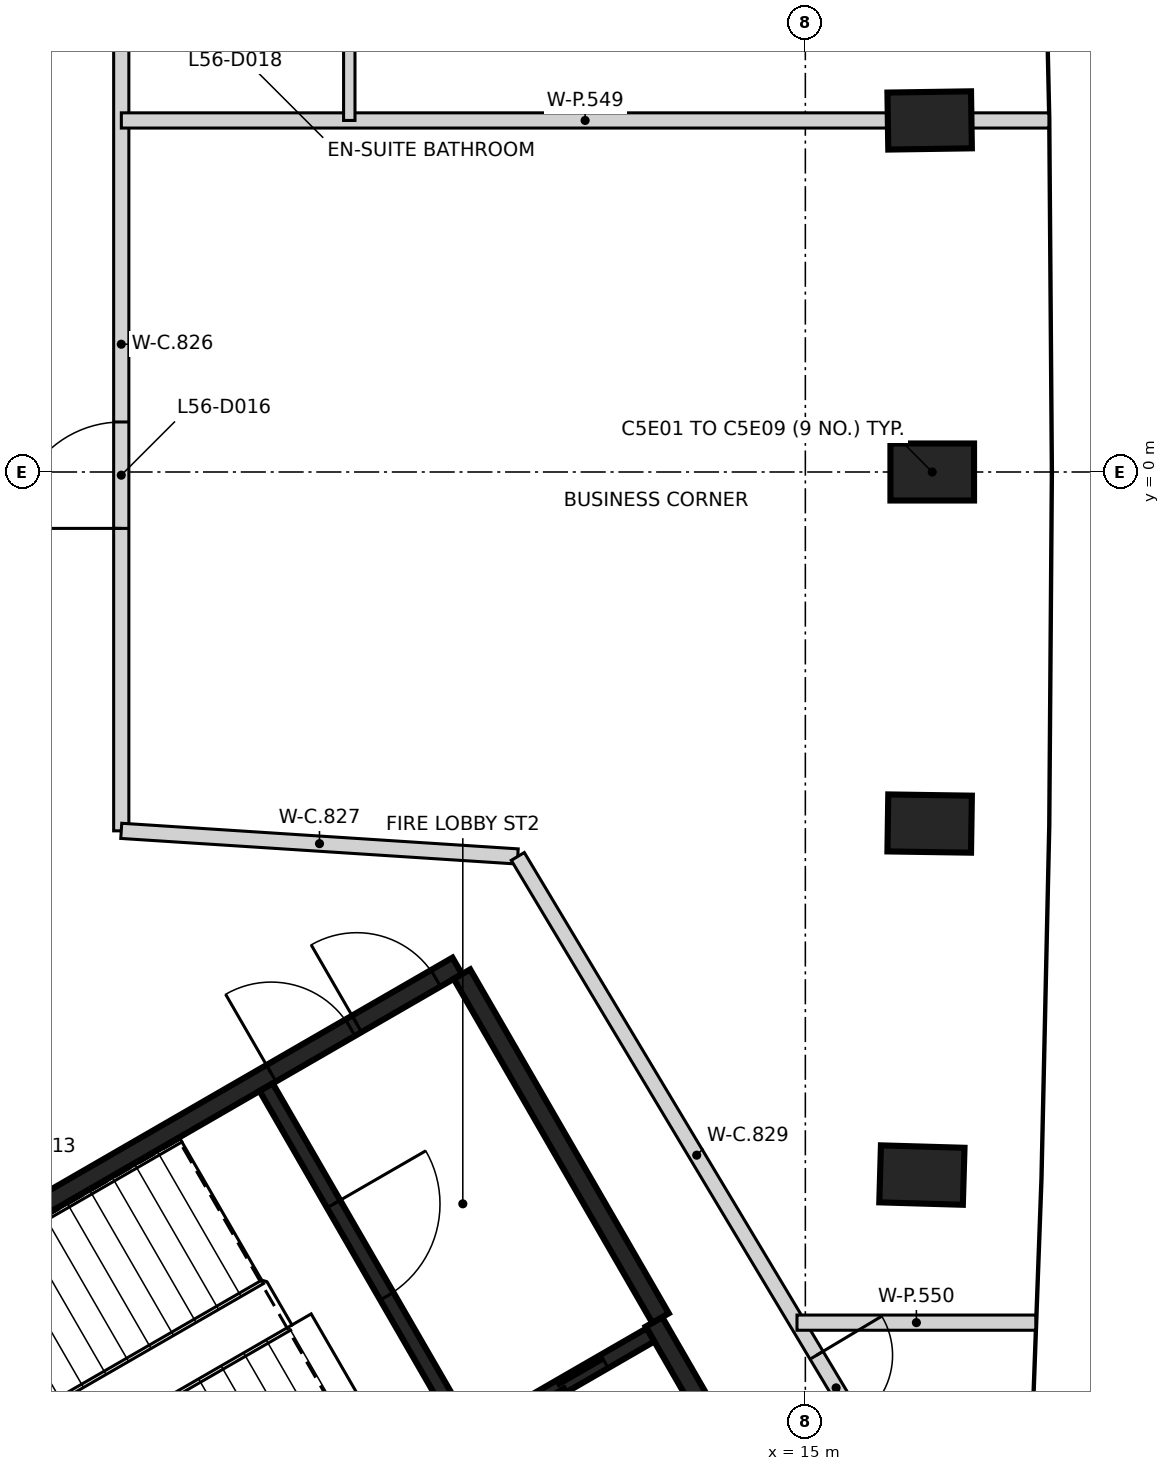
"""IFC4 building model, lengths in metres.
Left out: names, types, materials, properties, quantities, classifications, styles, units other than length and angle.
Written with IfcOpenShell. Run it as: python <this file> out.ifc"""

import sys

from ifc_helpers import new_model, si_unit, direction, frame, frame_2d, origin, origin_2d, place, context, subcontext, project, spatial, rectangle, extrude, element, fill, save


model = new_model("IFC4")
c1 = context("Model", 3, precision=1e-05, world=origin(), true_north=direction((0.0, 1.0)))
c2 = subcontext(c1, "Body", "Model", "MODEL_VIEW")
j1 = project(units=[si_unit("LENGTHUNIT", "METRE"), si_unit("PLANEANGLEUNIT", "RADIAN")], contexts=[c1])
p1 = place(None, origin())
s1 = spatial("IfcSite", under=j1, at=p1, CompositionType="ELEMENT")
p2 = place(p1, origin())
s2 = spatial("IfcBuilding", under=s1, at=p2, CompositionType="ELEMENT")
p3 = place(p2, frame((0.0, 0.0, 225.0)))
s3 = spatial("IfcBuildingStorey", under=s2, at=p3, CompositionType="ELEMENT", Elevation=225.0)
for number, where, z_axis, x_axis in (
    (1, (16.533, -9.25, -0.35), (0.0, 0.0, 1.0), (-1.0, 0.029, 0.0)),
    (2, (16.635, -4.625, -0.35), (0.0, 0.0, 1.0), (-1.0, 0.015, 0.0)),
    (3, (16.669, 0.0, -0.35), (0.0, 0.0, 1.0), (1.0, 0.0, 0.0)),
    (4, (16.635, 4.625, -0.35), (0.0, 0.0, 1.0), (1.0, 0.015, 0.0)),
):
    element("IfcColumn", number, at=place(p3, frame(where, z_axis=z_axis, x_axis=x_axis)), inside=s3, PredefinedType="COLUMN", context=c2, shape_type="SweptSolid", body=[
        extrude(rectangle(XDim=1.1, YDim=0.75, at=origin_2d()), origin(), (0.0, 0.0, 1.0), 3.6),
    ])
p4 = place(p3, frame((0.417, -12.273, 0.0), z_axis=(0.0, 0.0, 1.0), x_axis=(0.866021906294, 0.500006057782, 0.0)))
e5 = element("IfcWall", 5, at=p4, inside=s3, PredefinedType="SHEAR", context=c2, shape_type="SweptSolid", body=[
    extrude(rectangle(XDim=11.55, YDim=0.25, at=frame_2d((5.775, 0.0))), origin(), (0.0, 0.0, 1.0), 3.25),
])
p5 = place(p4, frame((10.025, 0.0, 0.0)))
e6 = element("IfcOpeningElement", 6, at=p5, cuts=e5, PredefinedType="OPENING", context=c2, shape_type="SweptSolid", body=[
    extrude(rectangle(XDim=1.2, YDim=2.1, at=frame_2d((0.6, 1.05))), frame((0.0, 0.135, 0.0), z_axis=(0.0, -1.0, 0.0), x_axis=(1.0, 0.0, 0.0)), (0.0, 0.0, 1.0), 0.27),
])
p6 = place(p4, frame((8.725, 0.0, 0.0)))
e7 = element("IfcOpeningElement", 7, at=p6, cuts=e5, PredefinedType="OPENING", context=c2, shape_type="SweptSolid", body=[
    extrude(rectangle(XDim=1.2, YDim=2.1, at=frame_2d((0.6, 1.05))), frame((0.0, 0.135, 0.0), z_axis=(0.0, -1.0, 0.0), x_axis=(1.0, 0.0, 0.0)), (0.0, 0.0, 1.0), 0.27),
])
p7 = place(p3, frame((13.008, -11.181, 0.0), z_axis=(0.0, 0.0, 1.0), x_axis=(0.500001955336, -0.866024274868, 0.0)))
e8 = element("IfcWall", 8, at=p7, inside=s3, PredefinedType="SHEAR", context=c2, shape_type="SweptSolid", body=[
    extrude(rectangle(XDim=6.125, YDim=0.25, at=frame_2d((3.062, 0.0))), origin(), (0.0, 0.0, 1.0), 3.25),
])
p8 = place(p7, frame((3.563, 0.0, 0.0)))
e9 = element("IfcOpeningElement", 9, at=p8, cuts=e8, PredefinedType="OPENING", context=c2, shape_type="SweptSolid", body=[
    extrude(rectangle(XDim=1.0, YDim=2.1, at=frame_2d((0.5, 1.05))), frame((0.0, 0.135, 0.0), z_axis=(0.0, -1.0, 0.0), x_axis=(1.0, 0.0, 0.0)), (0.0, 0.0, 1.0), 0.27),
])
p9 = place(p3, frame((10.483, -6.606, 0.0), z_axis=(0.0, 0.0, 1.0), x_axis=(0.49999885962, -0.866026062182, 0.0)))
e10 = element("IfcWall", 10, at=p9, inside=s3, PredefinedType="SHEAR", context=c2, shape_type="SweptSolid", body=[
    extrude(rectangle(XDim=5.225, YDim=0.25, at=frame_2d((2.612, 0.0))), origin(), (0.0, 0.0, 1.0), 3.25),
])
p10 = place(p3, frame((7.906, -8.094, 0.0), z_axis=(0.0, 0.0, 1.0), x_axis=(0.500027839223, -0.866009330205, 0.0)))
e11 = element("IfcWall", 11, at=p10, inside=s3, PredefinedType="SHEAR", context=c2, shape_type="SweptSolid", body=[
    extrude(rectangle(XDim=5.098, YDim=0.2, at=frame_2d((2.549, 0.0))), origin(), (0.0, 0.0, 1.0), 3.25),
])
p11 = place(p10, frame((1.774, 0.0, 0.0)))
e12 = element("IfcOpeningElement", 12, at=p11, cuts=e11, PredefinedType="OPENING", context=c2, shape_type="SweptSolid", body=[
    extrude(rectangle(XDim=1.4, YDim=2.1, at=frame_2d((0.7, 1.05))), frame((0.0, 0.11, 0.0), z_axis=(0.0, -1.0, 0.0), x_axis=(1.0, 0.0, 0.0)), (0.0, 0.0, 1.0), 0.22),
])
p12 = place(p3, frame((10.666, -12.678, 0.0), z_axis=(0.0, 0.0, 1.0), x_axis=(0.866018407898, 0.500012117035, 0.0)))
e13 = element("IfcWall", 13, at=p12, inside=s3, PredefinedType="SHEAR", context=c2, shape_type="SweptSolid", body=[
    extrude(rectangle(XDim=2.651, YDim=0.2, at=frame_2d((1.325, 0.0))), origin(), (0.0, 0.0, 1.0), 3.25),
])
p13 = place(p12, frame((0.652, 0.0, 0.0)))
e14 = element("IfcOpeningElement", 14, at=p13, cuts=e13, PredefinedType="OPENING", context=c2, shape_type="SweptSolid", body=[
    extrude(rectangle(XDim=1.3, YDim=2.1, at=frame_2d((0.65, 1.05))), frame((0.0, 0.11, 0.0), z_axis=(0.0, -1.0, 0.0), x_axis=(1.0, 0.0, 0.0)), (0.0, 0.0, 1.0), 0.22),
])
p14 = place(p3, frame((6.0, -4.721, 0.0), z_axis=(0.0, 0.0, 1.0), x_axis=(0.0, 1.0, 0.0)))
e15 = element("IfcWall", 15, at=p14, inside=s3, PredefinedType="PARTITIONING", context=c2, shape_type="SweptSolid", body=[
    extrude(rectangle(XDim=12.804, YDim=0.2, at=frame_2d((6.402, 0.0))), origin(), (0.0, 0.0, 1.0), 3.25),
])
p15 = place(p14, frame((3.979, 0.0, 0.0)))
e16 = element("IfcOpeningElement", 16, at=p15, cuts=e15, PredefinedType="OPENING", context=c2, shape_type="SweptSolid", body=[
    extrude(rectangle(XDim=1.4, YDim=2.1, at=frame_2d((0.7, 1.05))), frame((0.0, 0.11, 0.0), z_axis=(0.0, -1.0, 0.0), x_axis=(1.0, 0.0, 0.0)), (0.0, 0.0, 1.0), 0.22),
])
p16 = place(p14, frame((11.654, 0.0, 0.0)))
e17 = element("IfcOpeningElement", 17, at=p16, cuts=e15, PredefinedType="OPENING", context=c2, shape_type="SweptSolid", body=[
    extrude(rectangle(XDim=0.95, YDim=2.1, at=frame_2d((0.475, 1.05))), frame((0.0, 0.11, 0.0), z_axis=(0.0, -1.0, 0.0), x_axis=(1.0, 0.0, 0.0)), (0.0, 0.0, 1.0), 0.22),
])
p17 = place(p3, frame((6.0, -4.721, 0.0), z_axis=(0.0, 0.0, 1.0), x_axis=(0.997917460423, -0.064503815251, 0.0)))
e18 = element("IfcWall", 18, at=p17, inside=s3, PredefinedType="PARTITIONING", context=c2, shape_type="SweptSolid", body=[
    extrude(rectangle(XDim=5.227, YDim=0.2, at=frame_2d((2.614, 0.0))), origin(), (0.0, 0.0, 1.0), 3.25),
])
p18 = place(p3, frame((11.217, -5.058, 0.0), z_axis=(0.0, 0.0, 1.0), x_axis=(0.513856906336, -0.857875911662, 0.0)))
e19 = element("IfcWall", 19, at=p18, inside=s3, PredefinedType="PARTITIONING", context=c2, shape_type="SweptSolid", body=[
    extrude(rectangle(XDim=9.163, YDim=0.2, at=frame_2d((4.581, 0.0))), origin(), (0.0, 0.0, 1.0), 3.25),
])
p19 = place(p18, frame((7.65, 0.0, 0.0)))
e20 = element("IfcOpeningElement", 20, at=p19, cuts=e19, PredefinedType="OPENING", context=c2, shape_type="SweptSolid", body=[
    extrude(rectangle(XDim=1.0, YDim=2.1, at=frame_2d((0.5, 1.05))), frame((0.0, 0.11, 0.0), z_axis=(0.0, -1.0, 0.0), x_axis=(1.0, 0.0, 0.0)), (0.0, 0.0, 1.0), 0.22),
])
p20 = place(p3, frame((6.001, 4.625, 0.0), z_axis=(0.0, 0.0, 1.0), x_axis=(1.0, 0.0, 0.0)))
e21 = element("IfcWall", 21, at=p20, inside=s3, PredefinedType="PARTITIONING", context=c2, shape_type="SweptSolid", body=[
    extrude(rectangle(XDim=12.203, YDim=0.2, at=frame_2d((6.102, 0.0))), origin(), (0.0, 0.0, 1.0), 3.25),
])
p21 = place(p3, frame((14.89, -11.191, 0.0), z_axis=(0.0, 0.0, 1.0), x_axis=(1.0, 0.0, 0.0)))
e22 = element("IfcWall", 22, at=p21, inside=s3, PredefinedType="PARTITIONING", context=c2, shape_type="SweptSolid", body=[
    extrude(rectangle(XDim=3.142, YDim=0.2, at=frame_2d((1.571, 0.0))), origin(), (0.0, 0.0, 1.0), 2.35),
])
p22 = place(p3, frame((9.0, 4.625, 0.0), z_axis=(0.0, 0.0, 1.0), x_axis=(0.0, 1.0, 0.0)))
e23 = element("IfcWall", 23, at=p22, inside=s3, PredefinedType="PARTITIONING", context=c2, shape_type="SweptSolid", body=[
    extrude(rectangle(XDim=1.858, YDim=0.15, at=frame_2d((0.929, 0.0))), origin(), (0.0, 0.0, 1.0), 3.25),
])
p23 = place(p13, origin())
e24 = element("IfcDoor", 24, at=p23, inside=s3, OperationType="SLIDING_TO_LEFT", PredefinedType="DOOR", context=c2, shape_type="SweptSolid", body=[
    extrude(rectangle(XDim=1.3, YDim=2.1, at=frame_2d((0.65, 1.05))), frame((0.0, 0.025, 0.0), z_axis=(0.0, -1.0, 0.0), x_axis=(1.0, 0.0, 0.0)), (0.0, 0.0, 1.0), 0.05),
])
fill(e14, e24)
p24 = place(p5, origin())
e25 = element("IfcDoor", 25, at=p24, inside=s3, OperationType="SINGLE_SWING_LEFT", PredefinedType="DOOR", context=c2, shape_type="SweptSolid", body=[
    extrude(rectangle(XDim=1.2, YDim=2.1, at=frame_2d((0.6, 1.05))), frame((0.0, 0.025, 0.0), z_axis=(0.0, -1.0, 0.0), x_axis=(1.0, 0.0, 0.0)), (0.0, 0.0, 1.0), 0.05),
])
fill(e6, e25)
p25 = place(p6, origin())
e26 = element("IfcDoor", 26, at=p25, inside=s3, OperationType="SINGLE_SWING_RIGHT", PredefinedType="DOOR", context=c2, shape_type="SweptSolid", body=[
    extrude(rectangle(XDim=1.2, YDim=2.1, at=frame_2d((0.6, 1.05))), frame((0.0, 0.025, 0.0), z_axis=(0.0, -1.0, 0.0), x_axis=(1.0, 0.0, 0.0)), (0.0, 0.0, 1.0), 0.05),
])
fill(e7, e26)
p26 = place(p11, origin())
e27 = element("IfcDoor", 27, at=p26, inside=s3, OperationType="SINGLE_SWING_LEFT", PredefinedType="DOOR", context=c2, shape_type="SweptSolid", body=[
    extrude(rectangle(XDim=1.4, YDim=2.1, at=frame_2d((0.7, 1.05))), frame((0.0, 0.025, 0.0), z_axis=(0.0, -1.0, 0.0), x_axis=(1.0, 0.0, 0.0)), (0.0, 0.0, 1.0), 0.05),
])
fill(e12, e27)
p27 = place(p19, frame((1.0, 0.0, 0.0), z_axis=(0.0, 0.0, 1.0), x_axis=(-1.0, 0.0, 0.0)))
e28 = element("IfcDoor", 28, at=p27, inside=s3, OperationType="SINGLE_SWING_LEFT", PredefinedType="DOOR", context=c2, shape_type="SweptSolid", body=[
    extrude(rectangle(XDim=1.0, YDim=2.1, at=frame_2d((0.5, 1.05))), frame((0.0, 0.025, 0.0), z_axis=(0.0, -1.0, 0.0), x_axis=(1.0, 0.0, 0.0)), (0.0, 0.0, 1.0), 0.05),
])
fill(e20, e28)
p28 = place(p15, frame((1.4, 0.0, 0.0), z_axis=(0.0, 0.0, 1.0), x_axis=(-1.0, 0.0, 0.0)))
e29 = element("IfcDoor", 29, at=p28, inside=s3, OperationType="DOUBLE_DOOR_SINGLE_SWING", PredefinedType="DOOR", context=c2, shape_type="SweptSolid", body=[
    extrude(rectangle(XDim=1.4, YDim=2.1, at=frame_2d((0.7, 1.05))), frame((0.0, 0.025, 0.0), z_axis=(0.0, -1.0, 0.0), x_axis=(1.0, 0.0, 0.0)), (0.0, 0.0, 1.0), 0.05),
])
fill(e16, e29)
save(model, sys.argv[1])
